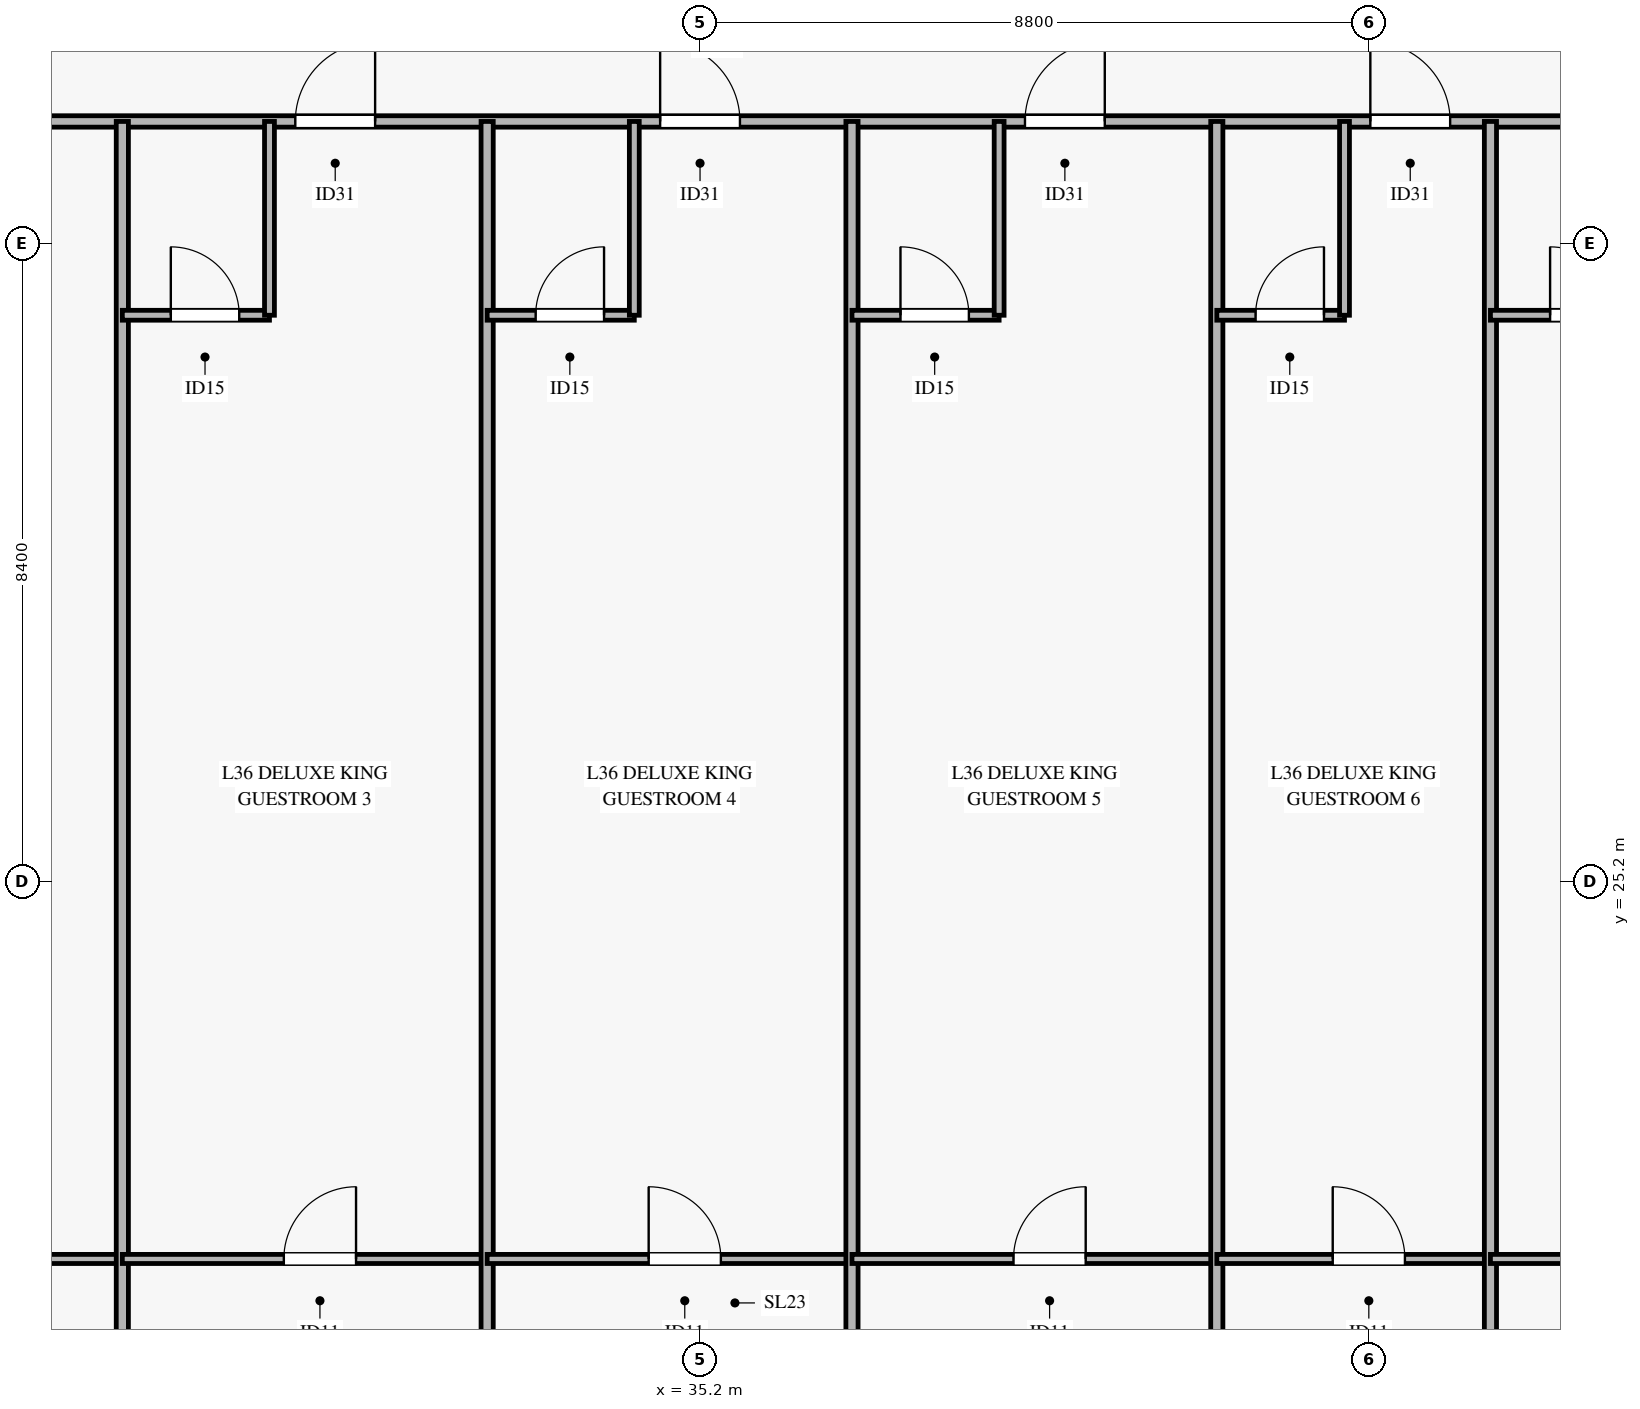
"""IFC4 building model, lengths in metres.
Left out: names, types, materials, properties, quantities, classifications, styles, units other than length and angle.
Written with IfcOpenShell. Run it as: python <this file> out.ifc"""

import sys

from ifc_helpers import new_model, si_unit, direction, frame, frame_2d, origin, place, context, subcontext, project, spatial, rectangle, extrude, source, transform, mapped, element, fill, save


model = new_model("IFC4")
c1 = context("Model", 3, precision=1e-05, world=origin(), true_north=direction((0.0, 1.0)))
c2 = subcontext(c1, "Body", "Model", "MODEL_VIEW")
j1 = project(units=[si_unit("LENGTHUNIT", "METRE"), si_unit("PLANEANGLEUNIT", "RADIAN")], contexts=[c1])
p1 = place(None, origin())
s1 = spatial("IfcSite", under=j1, at=p1, CompositionType="ELEMENT")
p2 = place(p1, origin())
s2 = spatial("IfcBuilding", under=s1, at=p2, CompositionType="ELEMENT")
p3 = place(p2, frame((0.0, 0.0, 149.2)))
s3 = spatial("IfcBuildingStorey", under=s2, at=p3, CompositionType="ELEMENT", Elevation=149.2)
p4 = place(p3, frame((5.449, 35.2, 0.0), z_axis=(0.0, 0.0, 1.0), x_axis=(1.0, 0.0, 0.0)))
e1 = element("IfcWall", 1, at=p4, inside=s3, PredefinedType="PARTITIONING", context=c2, shape_type="SweptSolid", body=[
    extrude(rectangle(XDim=59.502, YDim=0.15, at=frame_2d((29.751, 0.0))), origin(), (0.0, 0.0, 1.0), 2.455),
])
p5 = place(p4, frame((2.77, 0.0, 0.0)))
e2 = element("IfcOpeningElement", 2, at=p5, cuts=e1, PredefinedType="OPENING", context=c2, shape_type="SweptSolid", body=[
    extrude(rectangle(XDim=1.05, YDim=2.15, at=frame_2d((0.525, 1.075))), frame((0.0, 0.085, 0.0), z_axis=(0.0, -1.0, 0.0), x_axis=(1.0, 0.0, 0.0)), (0.0, 0.0, 1.0), 0.17),
])
p6 = place(p4, frame((18.921, 0.0, 0.0)))
e3 = element("IfcOpeningElement", 3, at=p6, cuts=e1, PredefinedType="OPENING", context=c2, shape_type="SweptSolid", body=[
    extrude(rectangle(XDim=1.05, YDim=2.15, at=frame_2d((0.525, 1.075))), frame((0.0, 0.085, 0.0), z_axis=(0.0, -1.0, 0.0), x_axis=(1.0, 0.0, 0.0)), (0.0, 0.0, 1.0), 0.17),
])
p7 = place(p4, frame((24.427, 0.0, 0.0)))
e4 = element("IfcOpeningElement", 4, at=p7, cuts=e1, PredefinedType="OPENING", context=c2, shape_type="SweptSolid", body=[
    extrude(rectangle(XDim=1.05, YDim=2.15, at=frame_2d((0.525, 1.075))), frame((0.0, 0.085, 0.0), z_axis=(0.0, -1.0, 0.0), x_axis=(1.0, 0.0, 0.0)), (0.0, 0.0, 1.0), 0.17),
])
p8 = place(p4, frame((29.227, 0.0, 0.0)))
e5 = element("IfcOpeningElement", 5, at=p8, cuts=e1, PredefinedType="OPENING", context=c2, shape_type="SweptSolid", body=[
    extrude(rectangle(XDim=1.05, YDim=2.15, at=frame_2d((0.525, 1.075))), frame((0.0, 0.085, 0.0), z_axis=(0.0, -1.0, 0.0), x_axis=(1.0, 0.0, 0.0)), (0.0, 0.0, 1.0), 0.17),
])
p9 = place(p4, frame((34.027, 0.0, 0.0)))
e6 = element("IfcOpeningElement", 6, at=p9, cuts=e1, PredefinedType="OPENING", context=c2, shape_type="SweptSolid", body=[
    extrude(rectangle(XDim=1.05, YDim=2.15, at=frame_2d((0.525, 1.075))), frame((0.0, 0.085, 0.0), z_axis=(0.0, -1.0, 0.0), x_axis=(1.0, 0.0, 0.0)), (0.0, 0.0, 1.0), 0.17),
])
p10 = place(p4, frame((38.571, 0.0, 0.0)))
e7 = element("IfcOpeningElement", 7, at=p10, cuts=e1, PredefinedType="OPENING", context=c2, shape_type="SweptSolid", body=[
    extrude(rectangle(XDim=1.05, YDim=2.15, at=frame_2d((0.525, 1.075))), frame((0.0, 0.085, 0.0), z_axis=(0.0, -1.0, 0.0), x_axis=(1.0, 0.0, 0.0)), (0.0, 0.0, 1.0), 0.17),
])
p11 = place(p4, frame((42.721, 0.0, 0.0)))
e8 = element("IfcOpeningElement", 8, at=p11, cuts=e1, PredefinedType="OPENING", context=c2, shape_type="SweptSolid", body=[
    extrude(rectangle(XDim=1.05, YDim=2.15, at=frame_2d((0.525, 1.075))), frame((0.0, 0.085, 0.0), z_axis=(0.0, -1.0, 0.0), x_axis=(1.0, 0.0, 0.0)), (0.0, 0.0, 1.0), 0.17),
])
p12 = place(p3, frame((21.8, 20.233, 0.0), z_axis=(0.0, 0.0, 1.0), x_axis=(1.0, 0.0, 0.0)))
e9 = element("IfcWall", 9, at=p12, inside=s3, PredefinedType="PARTITIONING", context=c2, shape_type="SweptSolid", body=[
    extrude(rectangle(XDim=5.8, YDim=0.12, at=frame_2d((2.9, 0.0))), origin(), (0.0, 0.0, 1.0), 3.27),
])
p13 = place(p12, frame((2.625, 0.0, 0.0)))
e10 = element("IfcOpeningElement", 10, at=p13, cuts=e9, PredefinedType="OPENING", context=c2, shape_type="SweptSolid", body=[
    extrude(rectangle(XDim=0.95, YDim=2.1, at=frame_2d((0.475, 1.05))), frame((0.0, 0.07, 0.0), z_axis=(0.0, -1.0, 0.0), x_axis=(1.0, 0.0, 0.0)), (0.0, 0.0, 1.0), 0.14),
])
p14 = place(p3, frame((27.6, 8.572, 0.0), z_axis=(0.0, 0.0, 1.0), x_axis=(0.0, 1.0, 0.0)))
e11 = element("IfcWall", 11, at=p14, inside=s3, PredefinedType="PARTITIONING", context=c2, shape_type="SweptSolid", body=[
    extrude(rectangle(XDim=26.628, YDim=0.16, at=frame_2d((13.314, 0.0))), origin(), (0.0, 0.0, 1.0), 2.755),
])
p15 = place(p3, frame((27.6, 32.65, 0.0), z_axis=(0.0, 0.0, 1.0), x_axis=(1.0, 0.0, 0.0)))
e12 = element("IfcWall", 12, at=p15, inside=s3, PredefinedType="PARTITIONING", context=c2, shape_type="SweptSolid", body=[
    extrude(rectangle(XDim=1.936, YDim=0.13, at=frame_2d((0.968, 0.0))), origin(), (0.0, 0.0, 1.0), 2.805),
])
p16 = place(p15, frame((0.638, 0.0, 0.0)))
e13 = element("IfcOpeningElement", 13, at=p16, cuts=e12, PredefinedType="OPENING", context=c2, shape_type="SweptSolid", body=[
    extrude(rectangle(XDim=0.9, YDim=2.1, at=frame_2d((0.45, 1.05))), frame((0.0, 0.075, 0.0), z_axis=(0.0, -1.0, 0.0), x_axis=(1.0, 0.0, 0.0)), (0.0, 0.0, 1.0), 0.15),
])
p17 = place(p3, frame((29.536, 32.65, 0.0), z_axis=(0.0, 0.0, 1.0), x_axis=(0.0, 1.0, 0.0)))
e14 = element("IfcWall", 14, at=p17, inside=s3, PredefinedType="PARTITIONING", context=c2, shape_type="SweptSolid", body=[
    extrude(rectangle(XDim=2.55, YDim=0.13, at=frame_2d((1.275, 0.0))), origin(), (0.0, 0.0, 1.0), 2.805),
])
p18 = place(p3, frame((27.6, 20.233, 0.0), z_axis=(0.0, 0.0, 1.0), x_axis=(1.0, 0.0, 0.0)))
e15 = element("IfcWall", 15, at=p18, inside=s3, PredefinedType="PARTITIONING", context=c2, shape_type="SweptSolid", body=[
    extrude(rectangle(XDim=4.8, YDim=0.12, at=frame_2d((2.4, 0.0))), origin(), (0.0, 0.0, 1.0), 2.455),
])
p19 = place(p18, frame((2.125, 0.0, 0.0)))
e16 = element("IfcOpeningElement", 16, at=p19, cuts=e15, PredefinedType="OPENING", context=c2, shape_type="SweptSolid", body=[
    extrude(rectangle(XDim=0.95, YDim=2.1, at=frame_2d((0.475, 1.05))), frame((0.0, 0.07, 0.0), z_axis=(0.0, -1.0, 0.0), x_axis=(1.0, 0.0, 0.0)), (0.0, 0.0, 1.0), 0.14),
])
p20 = place(p3, frame((32.4, 8.572, 0.0), z_axis=(0.0, 0.0, 1.0), x_axis=(0.0, 1.0, 0.0)))
e17 = element("IfcWall", 17, at=p20, inside=s3, PredefinedType="PARTITIONING", context=c2, shape_type="SweptSolid", body=[
    extrude(rectangle(XDim=26.628, YDim=0.16, at=frame_2d((13.314, 0.0))), origin(), (0.0, 0.0, 1.0), 2.755),
])
p21 = place(p3, frame((32.4, 32.65, 0.0), z_axis=(0.0, 0.0, 1.0), x_axis=(1.0, 0.0, 0.0)))
e18 = element("IfcWall", 18, at=p21, inside=s3, PredefinedType="PARTITIONING", context=c2, shape_type="SweptSolid", body=[
    extrude(rectangle(XDim=1.936, YDim=0.13, at=frame_2d((0.968, 0.0))), origin(), (0.0, 0.0, 1.0), 2.805),
])
p22 = place(p21, frame((0.638, 0.0, 0.0)))
e19 = element("IfcOpeningElement", 19, at=p22, cuts=e18, PredefinedType="OPENING", context=c2, shape_type="SweptSolid", body=[
    extrude(rectangle(XDim=0.9, YDim=2.1, at=frame_2d((0.45, 1.05))), frame((0.0, 0.075, 0.0), z_axis=(0.0, -1.0, 0.0), x_axis=(1.0, 0.0, 0.0)), (0.0, 0.0, 1.0), 0.15),
])
p23 = place(p3, frame((34.336, 32.65, 0.0), z_axis=(0.0, 0.0, 1.0), x_axis=(0.0, 1.0, 0.0)))
e20 = element("IfcWall", 20, at=p23, inside=s3, PredefinedType="PARTITIONING", context=c2, shape_type="SweptSolid", body=[
    extrude(rectangle(XDim=2.55, YDim=0.13, at=frame_2d((1.275, 0.0))), origin(), (0.0, 0.0, 1.0), 2.805),
])
p24 = place(p3, frame((32.4, 20.233, 0.0), z_axis=(0.0, 0.0, 1.0), x_axis=(1.0, 0.0, 0.0)))
e21 = element("IfcWall", 21, at=p24, inside=s3, PredefinedType="PARTITIONING", context=c2, shape_type="SweptSolid", body=[
    extrude(rectangle(XDim=4.8, YDim=0.12, at=frame_2d((2.4, 0.0))), origin(), (0.0, 0.0, 1.0), 3.27),
])
p25 = place(p24, frame((2.125, 0.0, 0.0)))
e22 = element("IfcOpeningElement", 22, at=p25, cuts=e21, PredefinedType="OPENING", context=c2, shape_type="SweptSolid", body=[
    extrude(rectangle(XDim=0.95, YDim=2.1, at=frame_2d((0.475, 1.05))), frame((0.0, 0.07, 0.0), z_axis=(0.0, -1.0, 0.0), x_axis=(1.0, 0.0, 0.0)), (0.0, 0.0, 1.0), 0.14),
])
p26 = place(p3, frame((37.2, 8.572, 0.0), z_axis=(0.0, 0.0, 1.0), x_axis=(0.0, 1.0, 0.0)))
e23 = element("IfcWall", 23, at=p26, inside=s3, PredefinedType="PARTITIONING", context=c2, shape_type="SweptSolid", body=[
    extrude(rectangle(XDim=26.628, YDim=0.16, at=frame_2d((13.314, 0.0))), origin(), (0.0, 0.0, 1.0), 2.805),
])
p27 = place(p3, frame((37.2, 32.65, 0.0), z_axis=(0.0, 0.0, 1.0), x_axis=(1.0, 0.0, 0.0)))
e24 = element("IfcWall", 24, at=p27, inside=s3, PredefinedType="PARTITIONING", context=c2, shape_type="SweptSolid", body=[
    extrude(rectangle(XDim=1.936, YDim=0.13, at=frame_2d((0.968, 0.0))), origin(), (0.0, 0.0, 1.0), 2.455),
])
p28 = place(p27, frame((0.638, 0.0, 0.0)))
e25 = element("IfcOpeningElement", 25, at=p28, cuts=e24, PredefinedType="OPENING", context=c2, shape_type="SweptSolid", body=[
    extrude(rectangle(XDim=0.9, YDim=2.1, at=frame_2d((0.45, 1.05))), frame((0.0, 0.075, 0.0), z_axis=(0.0, -1.0, 0.0), x_axis=(1.0, 0.0, 0.0)), (0.0, 0.0, 1.0), 0.15),
])
p29 = place(p3, frame((39.136, 32.65, 0.0), z_axis=(0.0, 0.0, 1.0), x_axis=(0.0, 1.0, 0.0)))
e26 = element("IfcWall", 26, at=p29, inside=s3, PredefinedType="PARTITIONING", context=c2, shape_type="SweptSolid", body=[
    extrude(rectangle(XDim=2.55, YDim=0.13, at=frame_2d((1.275, 0.0))), origin(), (0.0, 0.0, 1.0), 2.805),
])
p30 = place(p3, frame((37.2, 20.233, 0.0), z_axis=(0.0, 0.0, 1.0), x_axis=(1.0, 0.0, 0.0)))
e27 = element("IfcWall", 27, at=p30, inside=s3, PredefinedType="PARTITIONING", context=c2, shape_type="SweptSolid", body=[
    extrude(rectangle(XDim=4.8, YDim=0.12, at=frame_2d((2.4, 0.0))), origin(), (0.0, 0.0, 1.0), 2.455),
])
p31 = place(p30, frame((2.125, 0.0, 0.0)))
e28 = element("IfcOpeningElement", 28, at=p31, cuts=e27, PredefinedType="OPENING", context=c2, shape_type="SweptSolid", body=[
    extrude(rectangle(XDim=0.95, YDim=2.1, at=frame_2d((0.475, 1.05))), frame((0.0, 0.07, 0.0), z_axis=(0.0, -1.0, 0.0), x_axis=(1.0, 0.0, 0.0)), (0.0, 0.0, 1.0), 0.14),
])
p32 = place(p3, frame((42.0, 8.572, 0.0), z_axis=(0.0, 0.0, 1.0), x_axis=(0.0, 1.0, 0.0)))
e29 = element("IfcWall", 29, at=p32, inside=s3, PredefinedType="PARTITIONING", context=c2, shape_type="SweptSolid", body=[
    extrude(rectangle(XDim=26.628, YDim=0.16, at=frame_2d((13.314, 0.0))), origin(), (0.0, 0.0, 1.0), 2.755),
])
p33 = place(p3, frame((42.0, 32.65, 0.0), z_axis=(0.0, 0.0, 1.0), x_axis=(1.0, 0.0, 0.0)))
e30 = element("IfcWall", 30, at=p33, inside=s3, PredefinedType="PARTITIONING", context=c2, shape_type="SweptSolid", body=[
    extrude(rectangle(XDim=1.68, YDim=0.13, at=frame_2d((0.84, 0.0))), origin(), (0.0, 0.0, 1.0), 2.805),
])
p34 = place(p33, frame((0.51, 0.0, 0.0)))
e31 = element("IfcOpeningElement", 31, at=p34, cuts=e30, PredefinedType="OPENING", context=c2, shape_type="SweptSolid", body=[
    extrude(rectangle(XDim=0.9, YDim=2.1, at=frame_2d((0.45, 1.05))), frame((0.0, 0.075, 0.0), z_axis=(0.0, -1.0, 0.0), x_axis=(1.0, 0.0, 0.0)), (0.0, 0.0, 1.0), 0.15),
])
p35 = place(p3, frame((43.68, 32.65, 0.0), z_axis=(0.0, 0.0, 1.0), x_axis=(0.0, 1.0, 0.0)))
e32 = element("IfcWall", 32, at=p35, inside=s3, PredefinedType="PARTITIONING", context=c2, shape_type="SweptSolid", body=[
    extrude(rectangle(XDim=2.55, YDim=0.13, at=frame_2d((1.275, 0.0))), origin(), (0.0, 0.0, 1.0), 2.805),
])
p36 = place(p3, frame((42.0, 20.233, 0.0), z_axis=(0.0, 0.0, 1.0), x_axis=(1.0, 0.0, 0.0)))
e33 = element("IfcWall", 33, at=p36, inside=s3, PredefinedType="PARTITIONING", context=c2, shape_type="SweptSolid", body=[
    extrude(rectangle(XDim=3.6, YDim=0.12, at=frame_2d((1.8, 0.0))), origin(), (0.0, 0.0, 1.0), 2.455),
])
p37 = place(p36, frame((1.525, 0.0, 0.0)))
e34 = element("IfcOpeningElement", 34, at=p37, cuts=e33, PredefinedType="OPENING", context=c2, shape_type="SweptSolid", body=[
    extrude(rectangle(XDim=0.95, YDim=2.1, at=frame_2d((0.475, 1.05))), frame((0.0, 0.07, 0.0), z_axis=(0.0, -1.0, 0.0), x_axis=(1.0, 0.0, 0.0)), (0.0, 0.0, 1.0), 0.14),
])
p38 = place(p3, frame((45.6, 8.572, 0.0), z_axis=(0.0, 0.0, 1.0), x_axis=(0.0, 1.0, 0.0)))
e35 = element("IfcWall", 35, at=p38, inside=s3, PredefinedType="PARTITIONING", context=c2, shape_type="SweptSolid", body=[
    extrude(rectangle(XDim=26.628, YDim=0.16, at=frame_2d((13.314, 0.0))), origin(), (0.0, 0.0, 1.0), 2.755),
])
p39 = place(p3, frame((45.6, 32.65, 0.0), z_axis=(0.0, 0.0, 1.0), x_axis=(1.0, 0.0, 0.0)))
e36 = element("IfcWall", 36, at=p39, inside=s3, PredefinedType="PARTITIONING", context=c2, shape_type="SweptSolid", body=[
    extrude(rectangle(XDim=2.23, YDim=0.13, at=frame_2d((1.115, 0.0))), origin(), (0.0, 0.0, 1.0), 2.805),
])
p40 = place(p39, frame((0.785, 0.0, 0.0)))
e37 = element("IfcOpeningElement", 37, at=p40, cuts=e36, PredefinedType="OPENING", context=c2, shape_type="SweptSolid", body=[
    extrude(rectangle(XDim=0.9, YDim=2.1, at=frame_2d((0.45, 1.05))), frame((0.0, 0.075, 0.0), z_axis=(0.0, -1.0, 0.0), x_axis=(1.0, 0.0, 0.0)), (0.0, 0.0, 1.0), 0.15),
])
p41 = place(p3, frame((45.6, 20.233, 0.0), z_axis=(0.0, 0.0, 1.0), x_axis=(1.0, 0.0, 0.0)))
e38 = element("IfcWall", 38, at=p41, inside=s3, PredefinedType="PARTITIONING", context=c2, shape_type="SweptSolid", body=[
    extrude(rectangle(XDim=19.351, YDim=0.12, at=frame_2d((9.675, 0.0))), origin(), (0.0, 0.0, 1.0), 2.455),
])
p42 = place(p41, frame((9.301, 0.0, 0.0)))
e39 = element("IfcOpeningElement", 39, at=p42, cuts=e38, PredefinedType="OPENING", context=c2, shape_type="SweptSolid", body=[
    extrude(rectangle(XDim=0.95, YDim=2.1, at=frame_2d((0.475, 1.05))), frame((0.0, 0.07, 0.0), z_axis=(0.0, -1.0, 0.0), x_axis=(1.0, 0.0, 0.0)), (0.0, 0.0, 1.0), 0.14),
])
m1 = source(origin(), c2, "Body", "SweptSolid", [
    extrude(rectangle(XDim=1.05, YDim=2.15, at=frame_2d((0.525, 1.075))), frame((0.0, 0.025, 0.0), z_axis=(0.0, -1.0, 0.0), x_axis=(1.0, 0.0, 0.0)), (0.0, 0.0, 1.0), 0.05),
])
p43 = place(p7, origin())
e40 = element("IfcDoor", 40, at=p43, inside=s3, OperationType="SINGLE_SWING_RIGHT", PredefinedType="DOOR", context=c2, shape_type="MappedRepresentation", body=[
    mapped(m1, transform((0.0, 0.0, 0.0), x_axis=(1.0, 0.0, 0.0), y_axis=(0.0, 1.0, 0.0), z_axis=(0.0, 0.0, 1.0), scale=1.0)),
])
fill(e4, e40)
m2 = source(origin(), c2, "Body", "SweptSolid", [
    extrude(rectangle(XDim=0.9, YDim=2.1, at=frame_2d((0.45, 1.05))), frame((0.0, 0.025, 0.0), z_axis=(0.0, -1.0, 0.0), x_axis=(1.0, 0.0, 0.0)), (0.0, 0.0, 1.0), 0.05),
])
p44 = place(p16, origin())
e41 = element("IfcDoor", 41, at=p44, inside=s3, OperationType="SINGLE_SWING_LEFT", PredefinedType="DOOR", context=c2, shape_type="MappedRepresentation", body=[
    mapped(m2, transform((0.0, 0.0, 0.0), x_axis=(1.0, 0.0, 0.0), y_axis=(0.0, 1.0, 0.0), z_axis=(0.0, 0.0, 1.0), scale=1.0)),
])
fill(e13, e41)
m3 = source(origin(), c2, "Body", "SweptSolid", [
    extrude(rectangle(XDim=0.95, YDim=2.1, at=frame_2d((0.475, 1.05))), frame((0.0, 0.025, 0.0), z_axis=(0.0, -1.0, 0.0), x_axis=(1.0, 0.0, 0.0)), (0.0, 0.0, 1.0), 0.05),
])
p45 = place(p19, origin())
e42 = element("IfcDoor", 42, at=p45, inside=s3, OperationType="SINGLE_SWING_RIGHT", PredefinedType="DOOR", context=c2, shape_type="MappedRepresentation", body=[
    mapped(m3, transform((0.0, 0.0, 0.0), x_axis=(1.0, 0.0, 0.0), y_axis=(0.0, 1.0, 0.0), z_axis=(0.0, 0.0, 1.0), scale=1.0)),
])
fill(e16, e42)
p46 = place(p8, origin())
e43 = element("IfcDoor", 43, at=p46, inside=s3, OperationType="SINGLE_SWING_LEFT", PredefinedType="DOOR", context=c2, shape_type="MappedRepresentation", body=[
    mapped(m1, transform((0.0, 0.0, 0.0), x_axis=(1.0, 0.0, 0.0), y_axis=(0.0, 1.0, 0.0), z_axis=(0.0, 0.0, 1.0), scale=1.0)),
])
fill(e5, e43)
p47 = place(p22, origin())
e44 = element("IfcDoor", 44, at=p47, inside=s3, OperationType="SINGLE_SWING_RIGHT", PredefinedType="DOOR", context=c2, shape_type="MappedRepresentation", body=[
    mapped(m2, transform((0.0, 0.0, 0.0), x_axis=(1.0, 0.0, 0.0), y_axis=(0.0, 1.0, 0.0), z_axis=(0.0, 0.0, 1.0), scale=1.0)),
])
fill(e19, e44)
p48 = place(p25, origin())
e45 = element("IfcDoor", 45, at=p48, inside=s3, OperationType="SINGLE_SWING_LEFT", PredefinedType="DOOR", context=c2, shape_type="MappedRepresentation", body=[
    mapped(m3, transform((0.0, 0.0, 0.0), x_axis=(1.0, 0.0, 0.0), y_axis=(0.0, 1.0, 0.0), z_axis=(0.0, 0.0, 1.0), scale=1.0)),
])
fill(e22, e45)
p49 = place(p9, origin())
e46 = element("IfcDoor", 46, at=p49, inside=s3, OperationType="SINGLE_SWING_RIGHT", PredefinedType="DOOR", context=c2, shape_type="MappedRepresentation", body=[
    mapped(m1, transform((0.0, 0.0, 0.0), x_axis=(1.0, 0.0, 0.0), y_axis=(0.0, 1.0, 0.0), z_axis=(0.0, 0.0, 1.0), scale=1.0)),
])
fill(e6, e46)
p50 = place(p28, origin())
e47 = element("IfcDoor", 47, at=p50, inside=s3, OperationType="SINGLE_SWING_LEFT", PredefinedType="DOOR", context=c2, shape_type="MappedRepresentation", body=[
    mapped(m2, transform((0.0, 0.0, 0.0), x_axis=(1.0, 0.0, 0.0), y_axis=(0.0, 1.0, 0.0), z_axis=(0.0, 0.0, 1.0), scale=1.0)),
])
fill(e25, e47)
p51 = place(p31, origin())
e48 = element("IfcDoor", 48, at=p51, inside=s3, OperationType="SINGLE_SWING_RIGHT", PredefinedType="DOOR", context=c2, shape_type="MappedRepresentation", body=[
    mapped(m3, transform((0.0, 0.0, 0.0), x_axis=(1.0, 0.0, 0.0), y_axis=(0.0, 1.0, 0.0), z_axis=(0.0, 0.0, 1.0), scale=1.0)),
])
fill(e28, e48)
p52 = place(p10, origin())
e49 = element("IfcDoor", 49, at=p52, inside=s3, OperationType="SINGLE_SWING_LEFT", PredefinedType="DOOR", context=c2, shape_type="MappedRepresentation", body=[
    mapped(m1, transform((0.0, 0.0, 0.0), x_axis=(1.0, 0.0, 0.0), y_axis=(0.0, 1.0, 0.0), z_axis=(0.0, 0.0, 1.0), scale=1.0)),
])
fill(e7, e49)
p53 = place(p34, origin())
e50 = element("IfcDoor", 50, at=p53, inside=s3, OperationType="SINGLE_SWING_RIGHT", PredefinedType="DOOR", context=c2, shape_type="MappedRepresentation", body=[
    mapped(m2, transform((0.0, 0.0, 0.0), x_axis=(1.0, 0.0, 0.0), y_axis=(0.0, 1.0, 0.0), z_axis=(0.0, 0.0, 1.0), scale=1.0)),
])
fill(e31, e50)
p54 = place(p37, origin())
e51 = element("IfcDoor", 51, at=p54, inside=s3, OperationType="SINGLE_SWING_LEFT", PredefinedType="DOOR", context=c2, shape_type="MappedRepresentation", body=[
    mapped(m3, transform((0.0, 0.0, 0.0), x_axis=(1.0, 0.0, 0.0), y_axis=(0.0, 1.0, 0.0), z_axis=(0.0, 0.0, 1.0), scale=1.0)),
])
fill(e34, e51)
p55 = place(p40, origin())
e52 = element("IfcDoor", 52, at=p55, inside=s3, OperationType="SINGLE_SWING_LEFT", PredefinedType="DOOR", context=c2, shape_type="MappedRepresentation", body=[
    mapped(m2, transform((0.0, 0.0, 0.0), x_axis=(1.0, 0.0, 0.0), y_axis=(0.0, 1.0, 0.0), z_axis=(0.0, 0.0, 1.0), scale=1.0)),
])
fill(e37, e52)
save(model, sys.argv[1])
